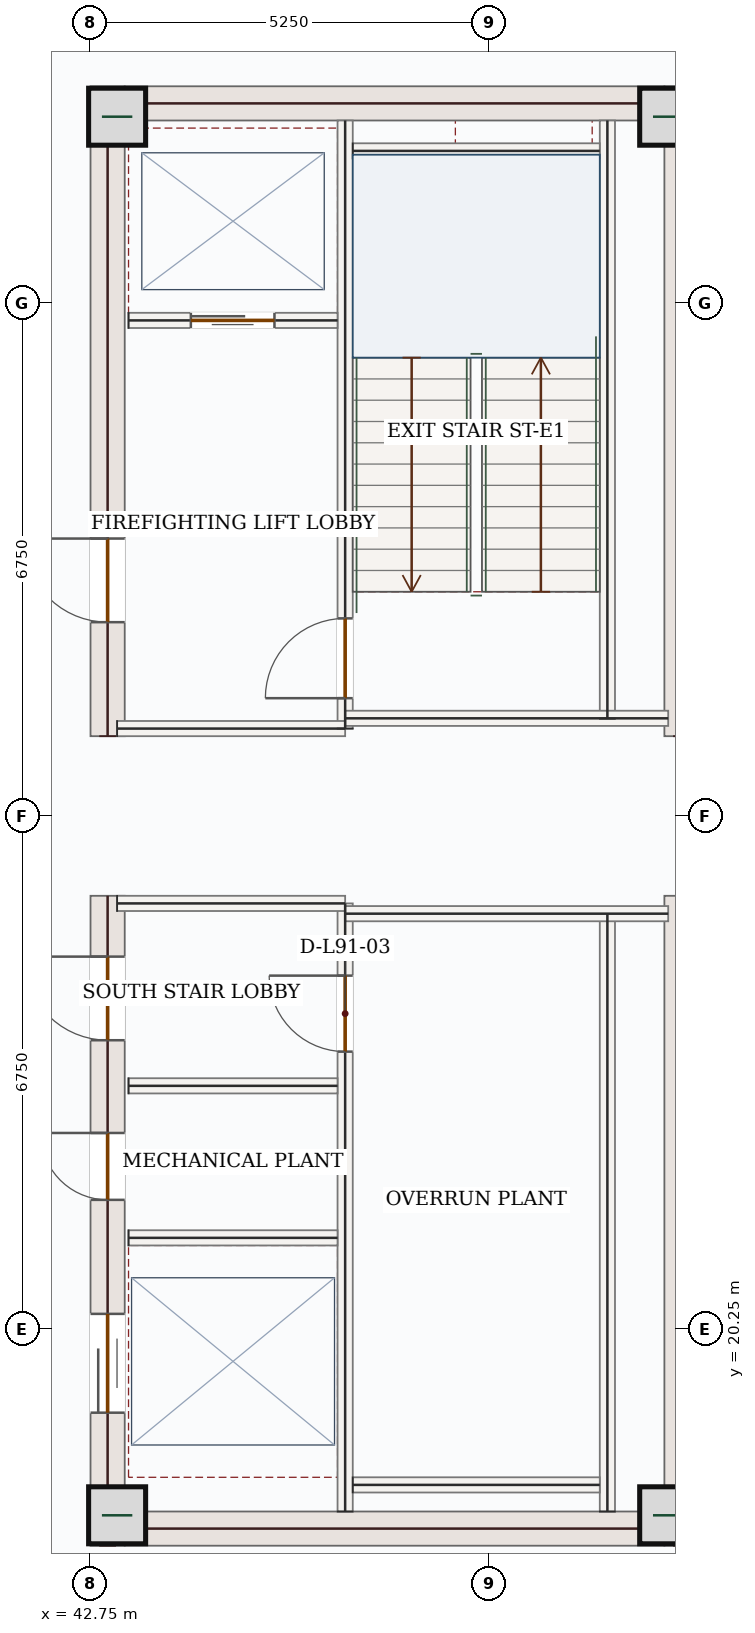
"""IFC4 building model, lengths in metres.
Left out: names, types, materials, properties, quantities, classifications, styles, units other than length and angle.
Written with IfcOpenShell. Run it as: python <this file> out.ifc"""

import sys

from ifc_helpers import new_model, si_unit, direction, frame, frame_2d, origin, origin_2d, place, context, subcontext, project, spatial, rectangle, extrude, source, transform, mapped, element, fill, save


model = new_model("IFC4")
c1 = context("Model", 3, precision=1e-05, world=origin(), true_north=direction((0.0, 1.0)))
c2 = subcontext(c1, "Body", "Model", "MODEL_VIEW")
j1 = project(units=[si_unit("LENGTHUNIT", "METRE"), si_unit("PLANEANGLEUNIT", "RADIAN")], contexts=[c1])
p1 = place(None, origin())
s1 = spatial("IfcSite", under=j1, at=p1, CompositionType="ELEMENT")
p2 = place(p1, origin())
s2 = spatial("IfcBuilding", under=s1, at=p2, CompositionType="ELEMENT")
p3 = place(p2, frame((0.0, 0.0, 375.15)))
s3 = spatial("IfcBuildingStorey", under=s2, at=p3, CompositionType="ELEMENT", Elevation=375.15)
p4 = place(p3, frame((42.975, 17.4, 0.0), z_axis=(0.0, 0.0, 1.0), x_axis=(0.0, 1.0, 0.0)))
e1 = element("IfcWall", 1, at=p4, inside=s3, PredefinedType="SHEAR", context=c2, shape_type="SweptSolid", body=[
    extrude(rectangle(XDim=8.55, YDim=0.45, at=frame_2d((4.275, 0.0))), origin(), (0.0, 0.0, 1.0), 4.25),
])
p5 = place(p4, frame((6.65, 0.0, 0.0)))
e2 = element("IfcOpeningElement", 2, at=p5, cuts=e1, PredefinedType="OPENING", context=c2, shape_type="SweptSolid", body=[
    extrude(rectangle(XDim=1.1, YDim=2.2, at=frame_2d((0.55, 1.1))), frame((0.0, 0.235, 0.0), z_axis=(0.0, -1.0, 0.0), x_axis=(1.0, 0.0, 0.0)), (0.0, 0.0, 1.0), 0.47),
])
p6 = place(p4, frame((1.75, 0.0, 0.0)))
e3 = element("IfcOpeningElement", 3, at=p6, cuts=e1, PredefinedType="OPENING", context=c2, shape_type="SweptSolid", body=[
    extrude(rectangle(XDim=1.3, YDim=2.2, at=frame_2d((0.65, 1.1))), frame((0.0, 0.235, 0.0), z_axis=(0.0, -1.0, 0.0), x_axis=(1.0, 0.0, 0.0)), (0.0, 0.0, 1.0), 0.47),
])
p7 = place(p4, frame((4.55, 0.0, 0.0)))
e4 = element("IfcOpeningElement", 4, at=p7, cuts=e1, PredefinedType="OPENING", context=c2, shape_type="SweptSolid", body=[
    extrude(rectangle(XDim=0.88, YDim=2.1, at=frame_2d((0.44, 1.05))), frame((0.0, 0.235, 0.0), z_axis=(0.0, -1.0, 0.0), x_axis=(1.0, 0.0, 0.0)), (0.0, 0.0, 1.0), 0.47),
])
p8 = place(p3, frame((42.975, 28.05, 0.0), z_axis=(0.0, 0.0, 1.0), x_axis=(0.0, 1.0, 0.0)))
e5 = element("IfcWall", 5, at=p8, inside=s3, PredefinedType="SHEAR", context=c2, shape_type="SweptSolid", body=[
    extrude(rectangle(XDim=8.55, YDim=0.45, at=frame_2d((4.275, 0.0))), origin(), (0.0, 0.0, 1.0), 4.25),
])
p9 = place(p8, frame((1.5, 0.0, 0.0)))
e6 = element("IfcOpeningElement", 6, at=p9, cuts=e5, PredefinedType="OPENING", context=c2, shape_type="SweptSolid", body=[
    extrude(rectangle(XDim=1.1, YDim=2.2, at=frame_2d((0.55, 1.1))), frame((0.0, 0.235, 0.0), z_axis=(0.0, -1.0, 0.0), x_axis=(1.0, 0.0, 0.0)), (0.0, 0.0, 1.0), 0.47),
])
m1 = source(origin(), c2, "Body", "SweptSolid", [
    extrude(rectangle(XDim=8.55, YDim=0.45, at=frame_2d((4.275, 0.0))), origin(), (0.0, 0.0, 1.0), 4.25),
])
for number, where, z_axis, x_axis in (
    (7, (50.525, 17.4, 0.0), (0.0, 0.0, 1.0), (0.0, 1.0, 0.0)),
    (8, (50.525, 28.05, 0.0), (0.0, 0.0, 1.0), (0.0, 1.0, 0.0)),
):
    element("IfcWall", number, at=place(p3, frame(where, z_axis=z_axis, x_axis=x_axis)), inside=s3, PredefinedType="SHEAR", context=c2, shape_type="MappedRepresentation", body=[
        mapped(m1, transform((0.0, 0.0, 0.0), x_axis=(1.0, 0.0, 0.0), y_axis=(0.0, 1.0, 0.0), z_axis=(0.0, 0.0, 1.0), scale=1.0)),
    ])
m2 = source(origin(), c2, "Body", "SweptSolid", [
    extrude(rectangle(XDim=7.1, YDim=0.45, at=frame_2d((3.55, 0.0))), origin(), (0.0, 0.0, 1.0), 4.25),
])
for number, where, z_axis, x_axis in (
    (9, (43.2, 17.625, 0.0), (0.0, 0.0, 1.0), (1.0, 0.0, 0.0)),
    (10, (43.2, 36.375, 0.0), (0.0, 0.0, 1.0), (1.0, 0.0, 0.0)),
):
    element("IfcWall", number, at=place(p3, frame(where, z_axis=z_axis, x_axis=x_axis)), inside=s3, PredefinedType="SHEAR", context=c2, shape_type="MappedRepresentation", body=[
        mapped(m2, transform((0.0, 0.0, 0.0), x_axis=(1.0, 0.0, 0.0), y_axis=(0.0, 1.0, 0.0), z_axis=(0.0, 0.0, 1.0), scale=1.0)),
    ])
m3 = source(origin(), c2, "Body", "SweptSolid", [
    extrude(rectangle(XDim=0.75, YDim=0.75, at=origin_2d()), origin(), (0.0, 0.0, 1.0), 4.5),
])
for number, where, z_axis, x_axis in (
    (11, (43.1, 17.8, 0.0), (0.0, 0.0, 1.0), (1.0, 0.0, 0.0)),
    (12, (50.35, 17.8, 0.0), (0.0, 0.0, 1.0), (1.0, 0.0, 0.0)),
    (13, (43.1, 36.2, 0.0), (0.0, 0.0, 1.0), (1.0, 0.0, 0.0)),
    (14, (50.35, 36.2, 0.0), (0.0, 0.0, 1.0), (1.0, 0.0, 0.0)),
):
    element("IfcColumn", number, at=place(p3, frame(where, z_axis=z_axis, x_axis=x_axis)), inside=s3, PredefinedType="COLUMN", context=c2, shape_type="MappedRepresentation", body=[
        mapped(m3, transform((0.0, 0.0, 0.0), x_axis=(1.0, 0.0, 0.0), y_axis=(0.0, 1.0, 0.0), z_axis=(0.0, 0.0, 1.0), scale=1.0)),
    ])
m4 = source(origin(), c2, "Body", "SweptSolid", [
    extrude(rectangle(XDim=5.258, YDim=0.26, at=frame_2d((2.629, 0.0))), origin(), (0.0, 0.0, 1.0), 4.25),
])
for number, where, z_axis, x_axis in (
    (15, (49.342, 39.26, 0.0), (0.0, 0.0, 1.0), (0.707, -0.707, 0.0)),
    (16, (53.06, 18.458, 0.0), (0.0, 0.0, 1.0), (-0.707, -0.707, 0.0)),
):
    element("IfcWall", number, at=place(p3, frame(where, z_axis=z_axis, x_axis=x_axis)), inside=s3, PredefinedType="SOLIDWALL", context=c2, shape_type="MappedRepresentation", body=[
        mapped(m4, transform((0.0, 0.0, 0.0), x_axis=(1.0, 0.0, 0.0), y_axis=(0.0, 1.0, 0.0), z_axis=(0.0, 0.0, 1.0), scale=1.0)),
    ])
m5 = source(origin(), c2, "Body", "SweptSolid", [
    extrude(rectangle(XDim=7.87, YDim=0.2, at=frame_2d((3.935, 0.0))), origin(), (0.0, 0.0, 1.0), 4.25),
])
for number, where, z_axis, x_axis in (
    (17, (49.55, 17.85, 0.0), (0.0, 0.0, 1.0), (0.0, 1.0, 0.0)),
    (18, (49.55, 28.28, 0.0), (0.0, 0.0, 1.0), (0.0, 1.0, 0.0)),
):
    element("IfcWall", number, at=place(p3, frame(where, z_axis=z_axis, x_axis=x_axis)), inside=s3, PredefinedType="SOLIDWALL", context=c2, shape_type="MappedRepresentation", body=[
        mapped(m5, transform((0.0, 0.0, 0.0), x_axis=(1.0, 0.0, 0.0), y_axis=(0.0, 1.0, 0.0), z_axis=(0.0, 0.0, 1.0), scale=1.0)),
    ])
p10 = place(p3, frame((46.1, 17.85, 0.0), z_axis=(0.0, 0.0, 1.0), x_axis=(0.0, 1.0, 0.0)))
e19 = element("IfcWall", 19, at=p10, inside=s3, PredefinedType="SOLIDWALL", context=c2, shape_type="SweptSolid", body=[
    extrude(rectangle(XDim=8.0, YDim=0.2, at=frame_2d((4.0, 0.0))), origin(), (0.0, 0.0, 1.0), 4.25),
])
p11 = place(p10, frame((6.05, 0.0, 0.0)))
e20 = element("IfcOpeningElement", 20, at=p11, cuts=e19, PredefinedType="OPENING", context=c2, shape_type="SweptSolid", body=[
    extrude(rectangle(XDim=1.0, YDim=2.15, at=frame_2d((0.5, 1.075))), frame((0.0, 0.11, 0.0), z_axis=(0.0, -1.0, 0.0), x_axis=(1.0, 0.0, 0.0)), (0.0, 0.0, 1.0), 0.22),
])
p12 = place(p3, frame((46.1, 28.15, 0.0), z_axis=(0.0, 0.0, 1.0), x_axis=(0.0, 1.0, 0.0)))
e21 = element("IfcWall", 21, at=p12, inside=s3, PredefinedType="SOLIDWALL", context=c2, shape_type="SweptSolid", body=[
    extrude(rectangle(XDim=8.0, YDim=0.2, at=frame_2d((4.0, 0.0))), origin(), (0.0, 0.0, 1.0), 4.25),
])
p13 = place(p12, frame((0.4, 0.0, 0.0)))
e22 = element("IfcOpeningElement", 22, at=p13, cuts=e21, PredefinedType="OPENING", context=c2, shape_type="SweptSolid", body=[
    extrude(rectangle(XDim=1.05, YDim=2.15, at=frame_2d((0.525, 1.075))), frame((0.0, 0.11, 0.0), z_axis=(0.0, -1.0, 0.0), x_axis=(1.0, 0.0, 0.0)), (0.0, 0.0, 1.0), 0.22),
])
m6 = source(origin(), c2, "Body", "SweptSolid", [
    extrude(rectangle(XDim=3.0, YDim=0.2, at=frame_2d((1.5, 0.0))), origin(), (0.0, 0.0, 1.0), 4.25),
])
p14 = place(p3, frame((43.1, 25.85, 0.0), z_axis=(0.0, 0.0, 1.0), x_axis=(1.0, 0.0, 0.0)))
e23 = element("IfcWall", 23, at=p14, inside=s3, PredefinedType="SOLIDWALL", context=c2, shape_type="MappedRepresentation", body=[
    mapped(m6, transform((0.0, 0.0, 0.0), x_axis=(1.0, 0.0, 0.0), y_axis=(0.0, 1.0, 0.0), z_axis=(0.0, 0.0, 1.0), scale=1.0)),
])
m7 = source(origin(), c2, "Body", "SweptSolid", [
    extrude(rectangle(XDim=4.25, YDim=0.2, at=frame_2d((2.125, 0.0))), origin(), (0.0, 0.0, 1.0), 4.25),
])
p15 = place(p3, frame((46.1, 25.715, 0.0), z_axis=(0.0, 0.0, 1.0), x_axis=(1.0, 0.0, 0.0)))
e24 = element("IfcWall", 24, at=p15, inside=s3, PredefinedType="SOLIDWALL", context=c2, shape_type="MappedRepresentation", body=[
    mapped(m7, transform((0.0, 0.0, 0.0), x_axis=(1.0, 0.0, 0.0), y_axis=(0.0, 1.0, 0.0), z_axis=(0.0, 0.0, 1.0), scale=1.0)),
])
p16 = place(p3, frame((43.1, 28.15, 0.0), z_axis=(0.0, 0.0, 1.0), x_axis=(1.0, 0.0, 0.0)))
e25 = element("IfcWall", 25, at=p16, inside=s3, PredefinedType="SOLIDWALL", context=c2, shape_type="MappedRepresentation", body=[
    mapped(m6, transform((0.0, 0.0, 0.0), x_axis=(1.0, 0.0, 0.0), y_axis=(0.0, 1.0, 0.0), z_axis=(0.0, 0.0, 1.0), scale=1.0)),
])
p17 = place(p3, frame((46.1, 28.285, 0.0), z_axis=(0.0, 0.0, 1.0), x_axis=(1.0, 0.0, 0.0)))
e26 = element("IfcWall", 26, at=p17, inside=s3, PredefinedType="SOLIDWALL", context=c2, shape_type="MappedRepresentation", body=[
    mapped(m7, transform((0.0, 0.0, 0.0), x_axis=(1.0, 0.0, 0.0), y_axis=(0.0, 1.0, 0.0), z_axis=(0.0, 0.0, 1.0), scale=1.0)),
])
m8 = source(origin(), c2, "Body", "SweptSolid", [
    extrude(rectangle(XDim=3.25, YDim=0.2, at=frame_2d((1.625, 0.0))), origin(), (0.0, 0.0, 1.0), 4.25),
])
for number, where, z_axis, x_axis in (
    (27, (46.2, 35.75, 0.0), (0.0, 0.0, 1.0), (1.0, 0.0, 0.0)),
    (28, (46.2, 18.2, 0.0), (0.0, 0.0, 1.0), (1.0, 0.0, 0.0)),
):
    element("IfcWall", number, at=place(p3, frame(where, z_axis=z_axis, x_axis=x_axis)), inside=s3, PredefinedType="SOLIDWALL", context=c2, shape_type="MappedRepresentation", body=[
        mapped(m8, transform((0.0, 0.0, 0.0), x_axis=(1.0, 0.0, 0.0), y_axis=(0.0, 1.0, 0.0), z_axis=(0.0, 0.0, 1.0), scale=1.0)),
    ])
p18 = place(p3, frame((43.25, 33.52, 0.0), z_axis=(0.0, 0.0, 1.0), x_axis=(1.0, 0.0, 0.0)))
e29 = element("IfcWall", 29, at=p18, inside=s3, PredefinedType="SOLIDWALL", context=c2, shape_type="SweptSolid", body=[
    extrude(rectangle(XDim=2.75, YDim=0.2, at=frame_2d((1.375, 0.0))), origin(), (0.0, 0.0, 1.0), 4.25),
])
p19 = place(p18, frame((0.82, 0.0, 0.0)))
e30 = element("IfcOpeningElement", 30, at=p19, cuts=e29, PredefinedType="OPENING", context=c2, shape_type="SweptSolid", body=[
    extrude(rectangle(XDim=1.1, YDim=2.15, at=frame_2d((0.55, 1.075))), frame((0.0, 0.11, 0.0), z_axis=(0.0, -1.0, 0.0), x_axis=(1.0, 0.0, 0.0)), (0.0, 0.0, 1.0), 0.22),
])
m9 = source(origin(), c2, "Body", "SweptSolid", [
    extrude(rectangle(XDim=2.75, YDim=0.2, at=frame_2d((1.375, 0.0))), origin(), (0.0, 0.0, 1.0), 4.25),
])
for number, where, z_axis, x_axis in (
    (31, (43.25, 23.45, 0.0), (0.0, 0.0, 1.0), (1.0, 0.0, 0.0)),
    (32, (43.25, 21.45, 0.0), (0.0, 0.0, 1.0), (1.0, 0.0, 0.0)),
):
    element("IfcWall", number, at=place(p3, frame(where, z_axis=z_axis, x_axis=x_axis)), inside=s3, PredefinedType="SOLIDWALL", context=c2, shape_type="MappedRepresentation", body=[
        mapped(m9, transform((0.0, 0.0, 0.0), x_axis=(1.0, 0.0, 0.0), y_axis=(0.0, 1.0, 0.0), z_axis=(0.0, 0.0, 1.0), scale=1.0)),
    ])
m10 = source(origin(), c2, "Body", "SweptSolid", [
    extrude(rectangle(XDim=1.05, YDim=2.15, at=frame_2d((0.525, 1.075))), frame((0.0, 0.025, 0.0), z_axis=(0.0, -1.0, 0.0), x_axis=(1.0, 0.0, 0.0)), (0.0, 0.0, 1.0), 0.05),
])
p20 = place(p13, origin())
e33 = element("IfcDoor", 33, at=p20, inside=s3, OperationType="SINGLE_SWING_LEFT", PredefinedType="DOOR", context=c2, shape_type="MappedRepresentation", body=[
    mapped(m10, transform((0.0, 0.0, 0.0), x_axis=(1.0, 0.0, 0.0), y_axis=(0.0, 1.0, 0.0), z_axis=(0.0, 0.0, 1.0), scale=1.0)),
])
fill(e22, e33)
m11 = source(origin(), c2, "Body", "SweptSolid", [
    extrude(rectangle(XDim=1.0, YDim=2.15, at=frame_2d((0.5, 1.075))), frame((0.0, 0.025, 0.0), z_axis=(0.0, -1.0, 0.0), x_axis=(1.0, 0.0, 0.0)), (0.0, 0.0, 1.0), 0.05),
])
p21 = place(p11, origin())
e34 = element("IfcDoor", 34, at=p21, inside=s3, OperationType="SINGLE_SWING_RIGHT", PredefinedType="DOOR", context=c2, shape_type="MappedRepresentation", body=[
    mapped(m11, transform((0.0, 0.0, 0.0), x_axis=(1.0, 0.0, 0.0), y_axis=(0.0, 1.0, 0.0), z_axis=(0.0, 0.0, 1.0), scale=1.0)),
])
fill(e20, e34)
m12 = source(origin(), c2, "Body", "SweptSolid", [
    extrude(rectangle(XDim=1.1, YDim=2.15, at=frame_2d((0.55, 1.075))), frame((0.0, 0.025, 0.0), z_axis=(0.0, -1.0, 0.0), x_axis=(1.0, 0.0, 0.0)), (0.0, 0.0, 1.0), 0.05),
])
p22 = place(p19, origin())
e35 = element("IfcDoor", 35, at=p22, inside=s3, OperationType="DOUBLE_DOOR_SLIDING", PredefinedType="DOOR", context=c2, shape_type="MappedRepresentation", body=[
    mapped(m12, transform((0.0, 0.0, 0.0), x_axis=(1.0, 0.0, 0.0), y_axis=(0.0, 1.0, 0.0), z_axis=(0.0, 0.0, 1.0), scale=1.0)),
])
fill(e30, e35)
m13 = source(origin(), c2, "Body", "SweptSolid", [
    extrude(rectangle(XDim=1.1, YDim=2.2, at=frame_2d((0.55, 1.1))), frame((0.0, 0.025, 0.0), z_axis=(0.0, -1.0, 0.0), x_axis=(1.0, 0.0, 0.0)), (0.0, 0.0, 1.0), 0.05),
])
p23 = place(p9, origin())
e36 = element("IfcDoor", 36, at=p23, inside=s3, OperationType="SINGLE_SWING_RIGHT", PredefinedType="DOOR", context=c2, shape_type="MappedRepresentation", body=[
    mapped(m13, transform((0.0, 0.0, 0.0), x_axis=(1.0, 0.0, 0.0), y_axis=(0.0, 1.0, 0.0), z_axis=(0.0, 0.0, 1.0), scale=1.0)),
])
fill(e6, e36)
p24 = place(p5, origin())
e37 = element("IfcDoor", 37, at=p24, inside=s3, OperationType="SINGLE_SWING_RIGHT", PredefinedType="DOOR", context=c2, shape_type="MappedRepresentation", body=[
    mapped(m13, transform((0.0, 0.0, 0.0), x_axis=(1.0, 0.0, 0.0), y_axis=(0.0, 1.0, 0.0), z_axis=(0.0, 0.0, 1.0), scale=1.0)),
])
fill(e2, e37)
m14 = source(origin(), c2, "Body", "SweptSolid", [
    extrude(rectangle(XDim=1.3, YDim=2.2, at=frame_2d((0.65, 1.1))), frame((0.0, 0.025, 0.0), z_axis=(0.0, -1.0, 0.0), x_axis=(1.0, 0.0, 0.0)), (0.0, 0.0, 1.0), 0.05),
])
p25 = place(p6, origin())
e38 = element("IfcDoor", 38, at=p25, inside=s3, OperationType="DOUBLE_DOOR_SLIDING", PredefinedType="DOOR", context=c2, shape_type="MappedRepresentation", body=[
    mapped(m14, transform((0.0, 0.0, 0.0), x_axis=(1.0, 0.0, 0.0), y_axis=(0.0, 1.0, 0.0), z_axis=(0.0, 0.0, 1.0), scale=1.0)),
])
fill(e3, e38)
m15 = source(origin(), c2, "Body", "SweptSolid", [
    extrude(rectangle(XDim=0.88, YDim=2.1, at=frame_2d((0.44, 1.05))), frame((0.0, 0.025, 0.0), z_axis=(0.0, -1.0, 0.0), x_axis=(1.0, 0.0, 0.0)), (0.0, 0.0, 1.0), 0.05),
])
p26 = place(p7, origin())
e39 = element("IfcDoor", 39, at=p26, inside=s3, OperationType="SINGLE_SWING_RIGHT", PredefinedType="DOOR", context=c2, shape_type="MappedRepresentation", body=[
    mapped(m15, transform((0.0, 0.0, 0.0), x_axis=(1.0, 0.0, 0.0), y_axis=(0.0, 1.0, 0.0), z_axis=(0.0, 0.0, 1.0), scale=1.0)),
])
fill(e4, e39)
save(model, sys.argv[1])
